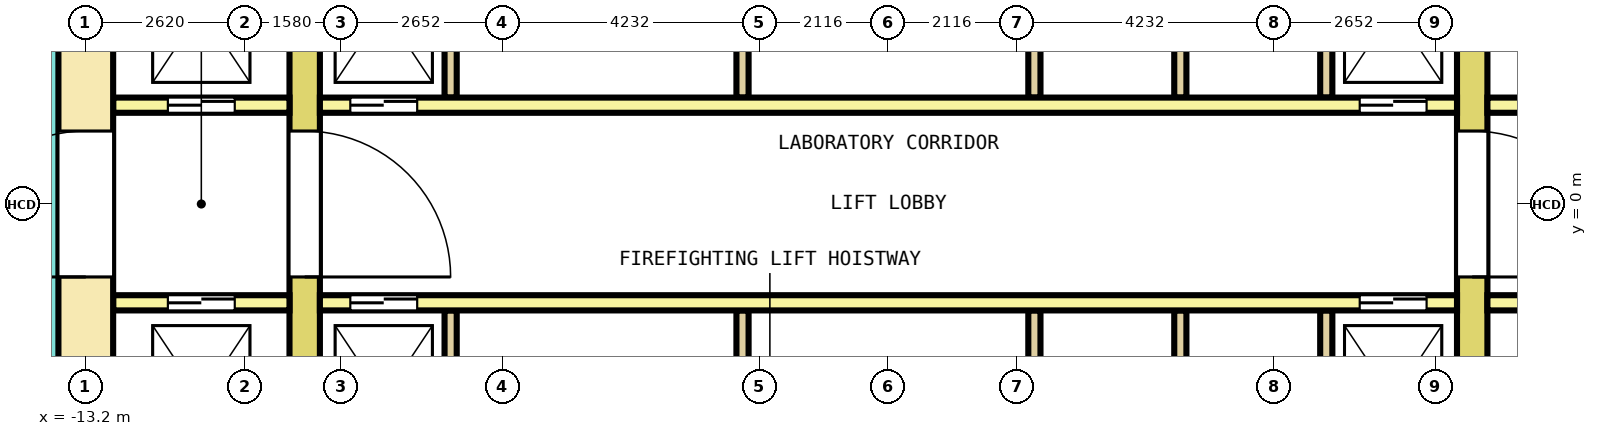
"""IFC4 building model, lengths in metres.
Left out: names, types, materials, properties, quantities, classifications, styles, units other than length and angle.
Written with IfcOpenShell. Run it as: python <this file> out.ifc"""

import sys

from ifc_helpers import new_model, si_unit, direction, frame, frame_2d, origin, place, context, subcontext, project, spatial, rectangle, extrude, element, fill, save


model = new_model("IFC4")
c1 = context("Model", 3, precision=1e-05, world=origin(), true_north=direction((0.0, 1.0)))
c2 = subcontext(c1, "Body", "Model", "MODEL_VIEW")
j1 = project(units=[si_unit("LENGTHUNIT", "METRE"), si_unit("PLANEANGLEUNIT", "RADIAN")], contexts=[c1])
p1 = place(None, origin())
s1 = spatial("IfcSite", under=j1, at=p1, CompositionType="ELEMENT")
p2 = place(p1, origin())
s2 = spatial("IfcBuilding", under=s1, at=p2, CompositionType="ELEMENT")
p3 = place(p2, frame((0.0, 0.0, 10.2)))
s3 = spatial("IfcBuildingStorey", under=s2, at=p3, CompositionType="ELEMENT", Elevation=10.2)
p4 = place(p3, frame((-13.2, -10.35, 0.0), z_axis=(0.0, 0.0, 1.0), x_axis=(0.0, 1.0, 0.0)))
e1 = element("IfcWall", 1, at=p4, inside=s3, PredefinedType="SHEAR", context=c2, shape_type="SweptSolid", body=[
    extrude(rectangle(XDim=20.7, YDim=0.9, at=frame_2d((10.35, 0.0))), origin(), (0.0, 0.0, 1.0), 4.1),
])
p5 = place(p4, frame((9.15, 0.0, 0.0)))
e2 = element("IfcOpeningElement", 2, at=p5, cuts=e1, PredefinedType="OPENING", context=c2, shape_type="SweptSolid", body=[
    extrude(rectangle(XDim=2.4, YDim=2.1, at=frame_2d((1.2, 1.05))), frame((0.0, 0.46, 0.0), z_axis=(0.0, -1.0, 0.0), x_axis=(1.0, 0.0, 0.0)), (0.0, 0.0, 1.0), 0.92),
])
p6 = place(p4, frame((16.05, 0.0, 0.0)))
e3 = element("IfcOpeningElement", 3, at=p6, cuts=e1, PredefinedType="OPENING", context=c2, shape_type="SweptSolid", body=[
    extrude(rectangle(XDim=1.2, YDim=2.1, at=frame_2d((0.6, 1.05))), frame((0.0, 0.46, 0.0), z_axis=(0.0, -1.0, 0.0), x_axis=(1.0, 0.0, 0.0)), (0.0, 0.0, 1.0), 0.92),
])
p7 = place(p4, frame((3.45, 0.0, 0.0)))
e4 = element("IfcOpeningElement", 4, at=p7, cuts=e1, PredefinedType="OPENING", context=c2, shape_type="SweptSolid", body=[
    extrude(rectangle(XDim=1.2, YDim=2.1, at=frame_2d((0.6, 1.05))), frame((0.0, 0.46, 0.0), z_axis=(0.0, -1.0, 0.0), x_axis=(1.0, 0.0, 0.0)), (0.0, 0.0, 1.0), 0.92),
])
p8 = place(p3, frame((-9.6, -7.7, 0.0), z_axis=(0.0, 0.0, 1.0), x_axis=(0.0, 1.0, 0.0)))
e5 = element("IfcWall", 5, at=p8, inside=s3, PredefinedType="SHEAR", context=c2, shape_type="SweptSolid", body=[
    extrude(rectangle(XDim=15.4, YDim=0.5, at=frame_2d((7.7, 0.0))), origin(), (0.0, 0.0, 1.0), 4.1),
])
p9 = place(p8, frame((6.5, 0.0, 0.0)))
e6 = element("IfcOpeningElement", 6, at=p9, cuts=e5, PredefinedType="OPENING", context=c2, shape_type="SweptSolid", body=[
    extrude(rectangle(XDim=2.4, YDim=2.1, at=frame_2d((1.2, 1.05))), frame((0.0, 0.26, 0.0), z_axis=(0.0, -1.0, 0.0), x_axis=(1.0, 0.0, 0.0)), (0.0, 0.0, 1.0), 0.52),
])
p10 = place(p8, frame((13.4, 0.0, 0.0)))
e7 = element("IfcOpeningElement", 7, at=p10, cuts=e5, PredefinedType="OPENING", context=c2, shape_type="SweptSolid", body=[
    extrude(rectangle(XDim=1.2, YDim=2.1, at=frame_2d((0.6, 1.05))), frame((0.0, 0.26, 0.0), z_axis=(0.0, -1.0, 0.0), x_axis=(1.0, 0.0, 0.0)), (0.0, 0.0, 1.0), 0.52),
])
p11 = place(p8, frame((0.8, 0.0, 0.0)))
e8 = element("IfcOpeningElement", 8, at=p11, cuts=e5, PredefinedType="OPENING", context=c2, shape_type="SweptSolid", body=[
    extrude(rectangle(XDim=1.2, YDim=2.1, at=frame_2d((0.6, 1.05))), frame((0.0, 0.26, 0.0), z_axis=(0.0, -1.0, 0.0), x_axis=(1.0, 0.0, 0.0)), (0.0, 0.0, 1.0), 0.52),
])
p12 = place(p3, frame((9.6, -7.7, 0.0), z_axis=(0.0, 0.0, 1.0), x_axis=(0.0, 1.0, 0.0)))
e9 = element("IfcWall", 9, at=p12, inside=s3, PredefinedType="SHEAR", context=c2, shape_type="SweptSolid", body=[
    extrude(rectangle(XDim=15.4, YDim=0.5, at=frame_2d((7.7, 0.0))), origin(), (0.0, 0.0, 1.0), 4.1),
])
p13 = place(p12, frame((6.5, 0.0, 0.0)))
e10 = element("IfcOpeningElement", 10, at=p13, cuts=e9, PredefinedType="OPENING", context=c2, shape_type="SweptSolid", body=[
    extrude(rectangle(XDim=2.4, YDim=2.1, at=frame_2d((1.2, 1.05))), frame((0.0, 0.26, 0.0), z_axis=(0.0, -1.0, 0.0), x_axis=(1.0, 0.0, 0.0)), (0.0, 0.0, 1.0), 0.52),
])
p14 = place(p12, frame((13.4, 0.0, 0.0)))
e11 = element("IfcOpeningElement", 11, at=p14, cuts=e9, PredefinedType="OPENING", context=c2, shape_type="SweptSolid", body=[
    extrude(rectangle(XDim=1.2, YDim=2.1, at=frame_2d((0.6, 1.05))), frame((0.0, 0.26, 0.0), z_axis=(0.0, -1.0, 0.0), x_axis=(1.0, 0.0, 0.0)), (0.0, 0.0, 1.0), 0.52),
])
p15 = place(p12, frame((0.9, 0.0, 0.0)))
e12 = element("IfcOpeningElement", 12, at=p15, cuts=e9, PredefinedType="OPENING", context=c2, shape_type="SweptSolid", body=[
    extrude(rectangle(XDim=1.0, YDim=2.1, at=frame_2d((0.5, 1.05))), frame((0.0, 0.26, 0.0), z_axis=(0.0, -1.0, 0.0), x_axis=(1.0, 0.0, 0.0)), (0.0, 0.0, 1.0), 0.52),
])
p16 = place(p3, frame((-12.75, 1.625, 0.0), z_axis=(0.0, 0.0, 1.0), x_axis=(1.0, 0.0, 0.0)))
e13 = element("IfcWall", 13, at=p16, inside=s3, PredefinedType="SOLIDWALL", context=c2, shape_type="SweptSolid", body=[
    extrude(rectangle(XDim=2.9, YDim=0.25, at=frame_2d((1.45, 0.0))), origin(), (0.0, 0.0, 1.0), 4.1),
])
p17 = place(p16, frame((0.9, 0.0, 0.0)))
e14 = element("IfcOpeningElement", 14, at=p17, cuts=e13, PredefinedType="OPENING", context=c2, shape_type="SweptSolid", body=[
    extrude(rectangle(XDim=1.1, YDim=2.1, at=frame_2d((0.55, 1.05))), frame((0.0, 0.135, 0.0), z_axis=(0.0, -1.0, 0.0), x_axis=(1.0, 0.0, 0.0)), (0.0, 0.0, 1.0), 0.27),
])
p18 = place(p3, frame((-9.35, 1.625, 0.0), z_axis=(0.0, 0.0, 1.0), x_axis=(1.0, 0.0, 0.0)))
e15 = element("IfcWall", 15, at=p18, inside=s3, PredefinedType="SOLIDWALL", context=c2, shape_type="SweptSolid", body=[
    extrude(rectangle(XDim=18.7, YDim=0.25, at=frame_2d((9.35, 0.0))), origin(), (0.0, 0.0, 1.0), 4.1),
])
p19 = place(p18, frame((0.5, 0.0, 0.0)))
e16 = element("IfcOpeningElement", 16, at=p19, cuts=e15, PredefinedType="OPENING", context=c2, shape_type="SweptSolid", body=[
    extrude(rectangle(XDim=1.1, YDim=2.1, at=frame_2d((0.55, 1.05))), frame((0.0, 0.135, 0.0), z_axis=(0.0, -1.0, 0.0), x_axis=(1.0, 0.0, 0.0)), (0.0, 0.0, 1.0), 0.27),
])
p20 = place(p18, frame((17.1, 0.0, 0.0)))
e17 = element("IfcOpeningElement", 17, at=p20, cuts=e15, PredefinedType="OPENING", context=c2, shape_type="SweptSolid", body=[
    extrude(rectangle(XDim=1.1, YDim=2.1, at=frame_2d((0.55, 1.05))), frame((0.0, 0.135, 0.0), z_axis=(0.0, -1.0, 0.0), x_axis=(1.0, 0.0, 0.0)), (0.0, 0.0, 1.0), 0.27),
])
p21 = place(p3, frame((9.85, 1.625, 0.0), z_axis=(0.0, 0.0, 1.0), x_axis=(1.0, 0.0, 0.0)))
e18 = element("IfcWall", 18, at=p21, inside=s3, PredefinedType="SOLIDWALL", context=c2, shape_type="SweptSolid", body=[
    extrude(rectangle(XDim=2.9, YDim=0.25, at=frame_2d((1.45, 0.0))), origin(), (0.0, 0.0, 1.0), 4.1),
])
p22 = place(p21, frame((0.9, 0.0, 0.0)))
e19 = element("IfcOpeningElement", 19, at=p22, cuts=e18, PredefinedType="OPENING", context=c2, shape_type="SweptSolid", body=[
    extrude(rectangle(XDim=1.1, YDim=2.1, at=frame_2d((0.55, 1.05))), frame((0.0, 0.135, 0.0), z_axis=(0.0, -1.0, 0.0), x_axis=(1.0, 0.0, 0.0)), (0.0, 0.0, 1.0), 0.27),
])
for number, where, z_axis, x_axis in (
    (20, (-7.2, 1.75, 0.0), (0.0, 0.0, 1.0), (0.0, 1.0, 0.0)),
    (21, (-2.4, 1.75, 0.0), (0.0, 0.0, 1.0), (0.0, 1.0, 0.0)),
    (22, (2.4, 1.75, 0.0), (0.0, 0.0, 1.0), (0.0, 1.0, 0.0)),
    (23, (4.8, 1.75, 0.0), (0.0, 0.0, 1.0), (0.0, 1.0, 0.0)),
    (24, (7.2, 1.75, 0.0), (0.0, 0.0, 1.0), (0.0, 1.0, 0.0)),
):
    element("IfcWall", number, at=place(p3, frame(where, z_axis=z_axis, x_axis=x_axis)), inside=s3, PredefinedType="SOLIDWALL", context=c2, shape_type="SweptSolid", body=[
        extrude(rectangle(XDim=2.9, YDim=0.2, at=frame_2d((1.45, 0.0))), origin(), (0.0, 0.0, 1.0), 4.1),
    ])
p23 = place(p3, frame((-12.75, -1.625, 0.0), z_axis=(0.0, 0.0, 1.0), x_axis=(1.0, 0.0, 0.0)))
e25 = element("IfcWall", 25, at=p23, inside=s3, PredefinedType="SOLIDWALL", context=c2, shape_type="SweptSolid", body=[
    extrude(rectangle(XDim=2.9, YDim=0.25, at=frame_2d((1.45, 0.0))), origin(), (0.0, 0.0, 1.0), 4.1),
])
p24 = place(p23, frame((0.9, 0.0, 0.0)))
e26 = element("IfcOpeningElement", 26, at=p24, cuts=e25, PredefinedType="OPENING", context=c2, shape_type="SweptSolid", body=[
    extrude(rectangle(XDim=1.1, YDim=2.1, at=frame_2d((0.55, 1.05))), frame((0.0, 0.135, 0.0), z_axis=(0.0, -1.0, 0.0), x_axis=(1.0, 0.0, 0.0)), (0.0, 0.0, 1.0), 0.27),
])
p25 = place(p3, frame((-9.35, -1.625, 0.0), z_axis=(0.0, 0.0, 1.0), x_axis=(1.0, 0.0, 0.0)))
e27 = element("IfcWall", 27, at=p25, inside=s3, PredefinedType="SOLIDWALL", context=c2, shape_type="SweptSolid", body=[
    extrude(rectangle(XDim=18.7, YDim=0.25, at=frame_2d((9.35, 0.0))), origin(), (0.0, 0.0, 1.0), 4.1),
])
p26 = place(p25, frame((0.5, 0.0, 0.0)))
e28 = element("IfcOpeningElement", 28, at=p26, cuts=e27, PredefinedType="OPENING", context=c2, shape_type="SweptSolid", body=[
    extrude(rectangle(XDim=1.1, YDim=2.1, at=frame_2d((0.55, 1.05))), frame((0.0, 0.135, 0.0), z_axis=(0.0, -1.0, 0.0), x_axis=(1.0, 0.0, 0.0)), (0.0, 0.0, 1.0), 0.27),
])
p27 = place(p25, frame((17.1, 0.0, 0.0)))
e29 = element("IfcOpeningElement", 29, at=p27, cuts=e27, PredefinedType="OPENING", context=c2, shape_type="SweptSolid", body=[
    extrude(rectangle(XDim=1.1, YDim=2.1, at=frame_2d((0.55, 1.05))), frame((0.0, 0.135, 0.0), z_axis=(0.0, -1.0, 0.0), x_axis=(1.0, 0.0, 0.0)), (0.0, 0.0, 1.0), 0.27),
])
p28 = place(p3, frame((9.85, -1.625, 0.0), z_axis=(0.0, 0.0, 1.0), x_axis=(1.0, 0.0, 0.0)))
e30 = element("IfcWall", 30, at=p28, inside=s3, PredefinedType="SOLIDWALL", context=c2, shape_type="SweptSolid", body=[
    extrude(rectangle(XDim=2.9, YDim=0.25, at=frame_2d((1.45, 0.0))), origin(), (0.0, 0.0, 1.0), 4.1),
])
p29 = place(p28, frame((0.9, 0.0, 0.0)))
e31 = element("IfcOpeningElement", 31, at=p29, cuts=e30, PredefinedType="OPENING", context=c2, shape_type="SweptSolid", body=[
    extrude(rectangle(XDim=1.1, YDim=2.1, at=frame_2d((0.55, 1.05))), frame((0.0, 0.135, 0.0), z_axis=(0.0, -1.0, 0.0), x_axis=(1.0, 0.0, 0.0)), (0.0, 0.0, 1.0), 0.27),
])
for number, where, z_axis, x_axis in (
    (32, (-7.2, -4.65, 0.0), (0.0, 0.0, 1.0), (0.0, 1.0, 0.0)),
    (33, (-2.4, -4.65, 0.0), (0.0, 0.0, 1.0), (0.0, 1.0, 0.0)),
    (34, (2.4, -4.65, 0.0), (0.0, 0.0, 1.0), (0.0, 1.0, 0.0)),
    (35, (4.8, -4.65, 0.0), (0.0, 0.0, 1.0), (0.0, 1.0, 0.0)),
    (36, (7.2, -4.65, 0.0), (0.0, 0.0, 1.0), (0.0, 1.0, 0.0)),
):
    element("IfcWall", number, at=place(p3, frame(where, z_axis=z_axis, x_axis=x_axis)), inside=s3, PredefinedType="SOLIDWALL", context=c2, shape_type="SweptSolid", body=[
        extrude(rectangle(XDim=2.9, YDim=0.2, at=frame_2d((1.45, 0.0))), origin(), (0.0, 0.0, 1.0), 4.1),
    ])
p30 = place(p17, origin())
e37 = element("IfcDoor", 37, at=p30, inside=s3, OperationType="DOUBLE_DOOR_SLIDING", PredefinedType="DOOR", context=c2, shape_type="SweptSolid", body=[
    extrude(rectangle(XDim=1.1, YDim=2.1, at=frame_2d((0.55, 1.05))), frame((0.0, 0.075, 0.0), z_axis=(0.0, -1.0, 0.0), x_axis=(1.0, 0.0, 0.0)), (0.0, 0.0, 1.0), 0.15),
])
fill(e14, e37)
p31 = place(p19, origin())
e38 = element("IfcDoor", 38, at=p31, inside=s3, OperationType="DOUBLE_DOOR_SLIDING", PredefinedType="DOOR", context=c2, shape_type="SweptSolid", body=[
    extrude(rectangle(XDim=1.1, YDim=2.1, at=frame_2d((0.55, 1.05))), frame((0.0, 0.075, 0.0), z_axis=(0.0, -1.0, 0.0), x_axis=(1.0, 0.0, 0.0)), (0.0, 0.0, 1.0), 0.15),
])
fill(e16, e38)
p32 = place(p20, origin())
e39 = element("IfcDoor", 39, at=p32, inside=s3, OperationType="DOUBLE_DOOR_SLIDING", PredefinedType="DOOR", context=c2, shape_type="SweptSolid", body=[
    extrude(rectangle(XDim=1.1, YDim=2.1, at=frame_2d((0.55, 1.05))), frame((0.0, 0.075, 0.0), z_axis=(0.0, -1.0, 0.0), x_axis=(1.0, 0.0, 0.0)), (0.0, 0.0, 1.0), 0.15),
])
fill(e17, e39)
p33 = place(p24, origin())
e40 = element("IfcDoor", 40, at=p33, inside=s3, OperationType="DOUBLE_DOOR_SLIDING", PredefinedType="DOOR", context=c2, shape_type="SweptSolid", body=[
    extrude(rectangle(XDim=1.1, YDim=2.1, at=frame_2d((0.55, 1.05))), frame((0.0, 0.075, 0.0), z_axis=(0.0, -1.0, 0.0), x_axis=(1.0, 0.0, 0.0)), (0.0, 0.0, 1.0), 0.15),
])
fill(e26, e40)
p34 = place(p26, origin())
e41 = element("IfcDoor", 41, at=p34, inside=s3, OperationType="DOUBLE_DOOR_SLIDING", PredefinedType="DOOR", context=c2, shape_type="SweptSolid", body=[
    extrude(rectangle(XDim=1.1, YDim=2.1, at=frame_2d((0.55, 1.05))), frame((0.0, 0.075, 0.0), z_axis=(0.0, -1.0, 0.0), x_axis=(1.0, 0.0, 0.0)), (0.0, 0.0, 1.0), 0.15),
])
fill(e28, e41)
p35 = place(p27, origin())
e42 = element("IfcDoor", 42, at=p35, inside=s3, OperationType="DOUBLE_DOOR_SLIDING", PredefinedType="DOOR", context=c2, shape_type="SweptSolid", body=[
    extrude(rectangle(XDim=1.1, YDim=2.1, at=frame_2d((0.55, 1.05))), frame((0.0, 0.075, 0.0), z_axis=(0.0, -1.0, 0.0), x_axis=(1.0, 0.0, 0.0)), (0.0, 0.0, 1.0), 0.15),
])
fill(e29, e42)
p36 = place(p9, origin())
e43 = element("IfcDoor", 43, at=p36, inside=s3, OperationType="DOUBLE_DOOR_SINGLE_SWING", PredefinedType="DOOR", context=c2, shape_type="SweptSolid", body=[
    extrude(rectangle(XDim=2.4, YDim=2.1, at=frame_2d((1.2, 1.05))), frame((0.0, 0.2, 0.0), z_axis=(0.0, -1.0, 0.0), x_axis=(1.0, 0.0, 0.0)), (0.0, 0.0, 1.0), 0.4),
])
fill(e6, e43)
p37 = place(p13, origin())
e44 = element("IfcDoor", 44, at=p37, inside=s3, OperationType="DOUBLE_DOOR_SINGLE_SWING", PredefinedType="DOOR", context=c2, shape_type="SweptSolid", body=[
    extrude(rectangle(XDim=2.4, YDim=2.1, at=frame_2d((1.2, 1.05))), frame((0.0, 0.2, 0.0), z_axis=(0.0, -1.0, 0.0), x_axis=(1.0, 0.0, 0.0)), (0.0, 0.0, 1.0), 0.4),
])
fill(e10, e44)
p38 = place(p5, origin())
e45 = element("IfcDoor", 45, at=p38, inside=s3, OperationType="DOUBLE_DOOR_SINGLE_SWING", PredefinedType="DOOR", context=c2, shape_type="SweptSolid", body=[
    extrude(rectangle(XDim=2.4, YDim=2.1, at=frame_2d((1.2, 1.05))), frame((0.0, 0.3, 0.0), z_axis=(0.0, -1.0, 0.0), x_axis=(1.0, 0.0, 0.0)), (0.0, 0.0, 1.0), 0.6),
])
fill(e2, e45)
save(model, sys.argv[1])
